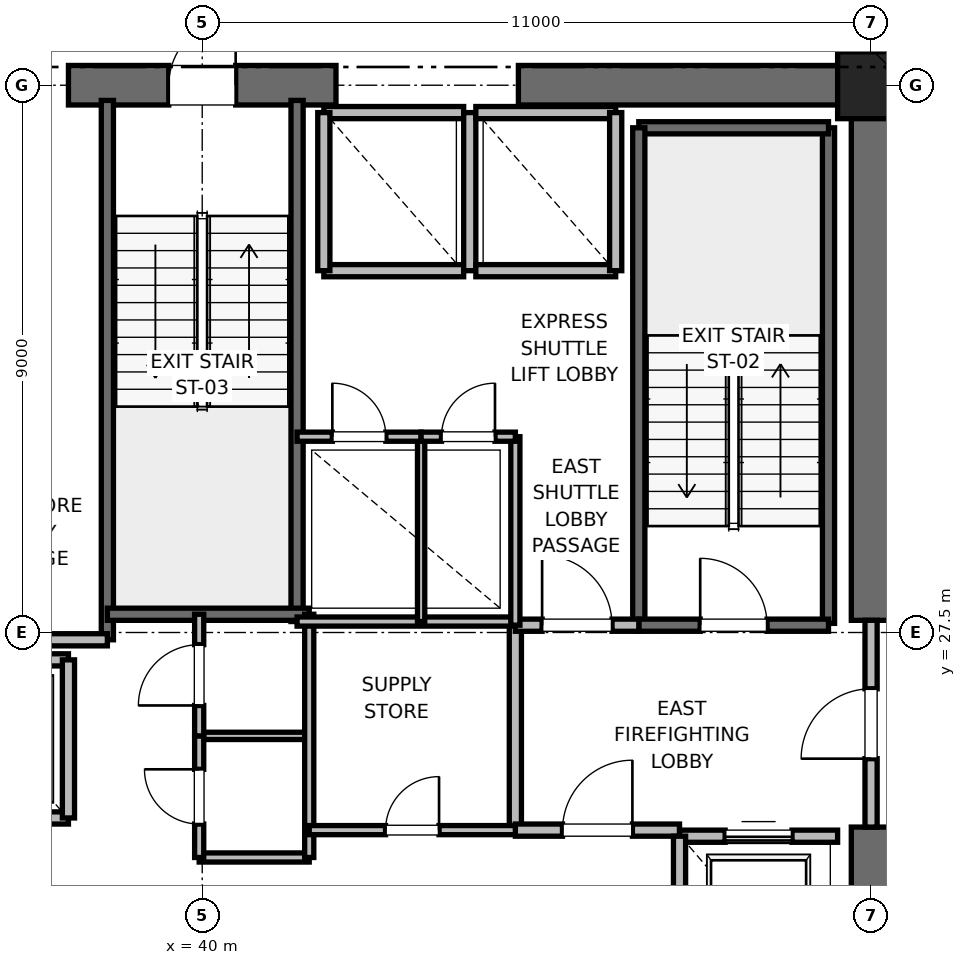
"""IFC4 building model, lengths in metres.
Left out: names, types, materials, properties, quantities, classifications, styles, units other than length and angle.
Written with IfcOpenShell. Run it as: python <this file> out.ifc"""

import sys

from ifc_helpers import new_model, si_unit, direction, frame, frame_2d, origin, origin_2d, place, context, subcontext, project, spatial, rectangle, extrude, element, fill, save


model = new_model("IFC4")
c1 = context("Model", 3, precision=1e-05, world=origin(), true_north=direction((0.0, 1.0)))
c2 = subcontext(c1, "Body", "Model", "MODEL_VIEW")
j1 = project(units=[si_unit("LENGTHUNIT", "METRE"), si_unit("PLANEANGLEUNIT", "RADIAN")], contexts=[c1])
p1 = place(None, origin())
s1 = spatial("IfcSite", under=j1, at=p1, CompositionType="ELEMENT")
p2 = place(p1, origin())
s2 = spatial("IfcBuilding", under=s1, at=p2, CompositionType="ELEMENT")
p3 = place(p2, frame((0.0, 0.0, 99.6)))
s3 = spatial("IfcBuildingStorey", under=s2, at=p3, CompositionType="ELEMENT", Elevation=99.6)
p4 = place(p3, frame((51.0, 36.5, 0.0), z_axis=(0.0, 0.0, 1.0), x_axis=(1.0, 0.0, 0.0)))
e1 = element("IfcColumn", 1, at=p4, inside=s3, PredefinedType="PILASTER", context=c2, shape_type="SweptSolid", body=[
    extrude(rectangle(XDim=1.1, YDim=1.1, at=origin_2d()), origin(), (0.0, 0.0, 1.0), 4.0),
])
p5 = place(p3, frame((37.8, 36.5, 0.0), z_axis=(0.0, 0.0, 1.0), x_axis=(1.0, 0.0, 0.0)))
e2 = element("IfcWall", 2, at=p5, inside=s3, PredefinedType="SHEAR", context=c2, shape_type="SweptSolid", body=[
    extrude(rectangle(XDim=4.4, YDim=0.65, at=frame_2d((2.2, 0.0))), origin(), (0.0, 0.0, 1.0), 3.76),
])
p6 = place(p5, frame((1.65, 0.0, 0.0)))
e3 = element("IfcOpeningElement", 3, at=p6, cuts=e2, PredefinedType="OPENING", context=c2, shape_type="SweptSolid", body=[
    extrude(rectangle(XDim=1.1, YDim=2.15, at=frame_2d((0.55, 1.075))), frame((0.0, 0.325, 0.0), z_axis=(0.0, -1.0, 0.0), x_axis=(1.0, 0.0, 0.0)), (0.0, 0.0, 1.0), 0.65),
])
for number, where, z_axis, x_axis in (
    (4, (45.2, 36.5, 0.0), (0.0, 0.0, 1.0), (1.0, 0.0, 0.0)),
    (5, (51.0, 18.5, 0.0), (0.0, 0.0, 1.0), (0.0, 1.0, 0.0)),
):
    element("IfcWall", number, at=place(p3, frame(where, z_axis=z_axis, x_axis=x_axis)), inside=s3, PredefinedType="SHEAR", context=c2, shape_type="SweptSolid", body=[
        extrude(rectangle(XDim=5.8, YDim=0.65, at=frame_2d((2.9, 0.0))), origin(), (0.0, 0.0, 1.0), 3.76),
    ])
p7 = place(p3, frame((51.0, 27.7, 0.0), z_axis=(0.0, 0.0, 1.0), x_axis=(0.0, 1.0, 0.0)))
e6 = element("IfcWall", 6, at=p7, inside=s3, PredefinedType="SHEAR", context=c2, shape_type="SweptSolid", body=[
    extrude(rectangle(XDim=8.8, YDim=0.65, at=frame_2d((4.4, 0.0))), origin(), (0.0, 0.0, 1.0), 3.76),
])
p8 = place(p3, frame((50.3, 27.65, 0.0), z_axis=(0.0, 0.0, 1.0), x_axis=(0.0, 1.0, 0.0)))
e7 = element("IfcWall", 7, at=p8, inside=s3, PredefinedType="SOLIDWALL", context=c2, shape_type="SweptSolid", body=[
    extrude(rectangle(XDim=8.15, YDim=0.2, at=frame_2d((4.075, 0.0))), origin(), (0.0, 0.0, 1.0), 3.76),
])
p9 = place(p3, frame((47.18, 35.8, 0.0), z_axis=(0.0, 0.0, 1.0), x_axis=(1.0, 0.0, 0.0)))
e8 = element("IfcWall", 8, at=p9, inside=s3, PredefinedType="SOLIDWALL", context=c2, shape_type="SweptSolid", body=[
    extrude(rectangle(XDim=3.12, YDim=0.2, at=frame_2d((1.56, 0.0))), origin(), (0.0, 0.0, 1.0), 3.76),
])
p10 = place(p3, frame((47.18, 27.62, 0.0), z_axis=(0.0, 0.0, 1.0), x_axis=(0.0, 1.0, 0.0)))
e9 = element("IfcWall", 9, at=p10, inside=s3, PredefinedType="SOLIDWALL", context=c2, shape_type="SweptSolid", body=[
    extrude(rectangle(XDim=8.18, YDim=0.2, at=frame_2d((4.09, 0.0))), origin(), (0.0, 0.0, 1.0), 3.76),
])
p11 = place(p3, frame((47.18, 27.62, 0.0), z_axis=(0.0, 0.0, 1.0), x_axis=(1.0, 0.0, 0.0)))
e10 = element("IfcWall", 10, at=p11, inside=s3, PredefinedType="SOLIDWALL", context=c2, shape_type="SweptSolid", body=[
    extrude(rectangle(XDim=3.12, YDim=0.2, at=frame_2d((1.56, 0.0))), origin(), (0.0, 0.0, 1.0), 3.76),
])
p12 = place(p11, frame((1.01, 0.0, 0.0)))
e11 = element("IfcOpeningElement", 11, at=p12, cuts=e10, PredefinedType="OPENING", context=c2, shape_type="SweptSolid", body=[
    extrude(rectangle(XDim=1.1, YDim=2.15, at=frame_2d((0.55, 1.075))), frame((0.0, 0.1, 0.0), z_axis=(0.0, -1.0, 0.0), x_axis=(1.0, 0.0, 0.0)), (0.0, 0.0, 1.0), 0.2),
])
p13 = place(p3, frame((38.44, 27.38, 0.0), z_axis=(0.0, 0.0, 1.0), x_axis=(0.0, 1.0, 0.0)))
e12 = element("IfcWall", 12, at=p13, inside=s3, PredefinedType="SOLIDWALL", context=c2, shape_type="SweptSolid", body=[
    extrude(rectangle(XDim=8.87, YDim=0.2, at=frame_2d((4.435, 0.0))), origin(), (0.0, 0.0, 1.0), 3.76),
])
p14 = place(p3, frame((41.56, 27.68, 0.0), z_axis=(0.0, 0.0, 1.0), x_axis=(0.0, 1.0, 0.0)))
e13 = element("IfcWall", 13, at=p14, inside=s3, PredefinedType="SOLIDWALL", context=c2, shape_type="SweptSolid", body=[
    extrude(rectangle(XDim=8.57, YDim=0.2, at=frame_2d((4.285, 0.0))), origin(), (0.0, 0.0, 1.0), 3.76),
])
p15 = place(p3, frame((38.44, 27.8, 0.0), z_axis=(0.0, 0.0, 1.0), x_axis=(1.0, 0.0, 0.0)))
e14 = element("IfcWall", 14, at=p15, inside=s3, PredefinedType="SOLIDWALL", context=c2, shape_type="SweptSolid", body=[
    extrude(rectangle(XDim=3.32, YDim=0.2, at=frame_2d((1.66, 0.0))), origin(), (0.0, 0.0, 1.0), 3.76),
])
p16 = place(p3, frame((32.82, 27.38, 0.0), z_axis=(0.0, 0.0, 1.0), x_axis=(1.0, 0.0, 0.0)))
e15 = element("IfcWall", 15, at=p16, inside=s3, PredefinedType="PARTITIONING", context=c2, shape_type="SweptSolid", body=[
    extrude(rectangle(XDim=5.62, YDim=0.2, at=frame_2d((2.81, 0.0))), origin(), (0.0, 0.0, 1.0), 3.76),
])
p17 = place(p3, frame((45.15, 24.25, 0.0), z_axis=(0.0, 0.0, 1.0), x_axis=(0.0, 1.0, 0.0)))
e16 = element("IfcWall", 16, at=p17, inside=s3, PredefinedType="PARTITIONING", context=c2, shape_type="SweptSolid", body=[
    extrude(rectangle(XDim=3.37, YDim=0.2, at=frame_2d((1.685, 0.0))), origin(), (0.0, 0.0, 1.0), 3.76),
])
p18 = place(p3, frame((45.15, 24.25, 0.0), z_axis=(0.0, 0.0, 1.0), x_axis=(1.0, 0.0, 0.0)))
e17 = element("IfcWall", 17, at=p18, inside=s3, PredefinedType="PARTITIONING", context=c2, shape_type="SweptSolid", body=[
    extrude(rectangle(XDim=2.7, YDim=0.2, at=frame_2d((1.35, 0.0))), origin(), (0.0, 0.0, 1.0), 3.76),
])
p19 = place(p18, frame((0.775, 0.0, 0.0)))
e18 = element("IfcOpeningElement", 18, at=p19, cuts=e17, PredefinedType="OPENING", context=c2, shape_type="SweptSolid", body=[
    extrude(rectangle(XDim=1.15, YDim=2.2, at=frame_2d((0.575, 1.1))), frame((0.0, 0.1, 0.0), z_axis=(0.0, -1.0, 0.0), x_axis=(1.0, 0.0, 0.0)), (0.0, 0.0, 1.0), 0.2),
])
p20 = place(p3, frame((45.15, 27.62, 0.0), z_axis=(0.0, 0.0, 1.0), x_axis=(1.0, 0.0, 0.0)))
e19 = element("IfcWall", 19, at=p20, inside=s3, PredefinedType="PARTITIONING", context=c2, shape_type="SweptSolid", body=[
    extrude(rectangle(XDim=2.03, YDim=0.2, at=frame_2d((1.015, 0.0))), origin(), (0.0, 0.0, 1.0), 3.76),
])
p21 = place(p20, frame((0.44, 0.0, 0.0)))
e20 = element("IfcOpeningElement", 20, at=p21, cuts=e19, PredefinedType="OPENING", context=c2, shape_type="SweptSolid", body=[
    extrude(rectangle(XDim=1.15, YDim=2.2, at=frame_2d((0.575, 1.1))), frame((0.0, 0.1, 0.0), z_axis=(0.0, -1.0, 0.0), x_axis=(1.0, 0.0, 0.0)), (0.0, 0.0, 1.0), 0.2),
])
p22 = place(p3, frame((51.0, 24.3, 0.0), z_axis=(0.0, 0.0, 1.0), x_axis=(0.0, 1.0, 0.0)))
e21 = element("IfcWall", 21, at=p22, inside=s3, PredefinedType="PARTITIONING", context=c2, shape_type="SweptSolid", body=[
    extrude(rectangle(XDim=3.4, YDim=0.2, at=frame_2d((1.7, 0.0))), origin(), (0.0, 0.0, 1.0), 2.54),
])
p23 = place(p22, frame((1.125, 0.0, 0.0)))
e22 = element("IfcOpeningElement", 22, at=p23, cuts=e21, PredefinedType="OPENING", context=c2, shape_type="SweptSolid", body=[
    extrude(rectangle(XDim=1.15, YDim=2.2, at=frame_2d((0.575, 1.1))), frame((0.0, 0.1, 0.0), z_axis=(0.0, -1.0, 0.0), x_axis=(1.0, 0.0, 0.0)), (0.0, 0.0, 1.0), 0.2),
])
p24 = place(p3, frame((50.45, 24.15, 0.0), z_axis=(0.0, 0.0, 1.0), x_axis=(-1.0, 0.0, 0.0)))
e23 = element("IfcWall", 23, at=p24, inside=s3, PredefinedType="SOLIDWALL", context=c2, shape_type="SweptSolid", body=[
    extrude(rectangle(XDim=2.6, YDim=0.2, at=frame_2d((1.3, 0.0))), origin(), (0.0, 0.0, 1.0), 2.54),
])
p25 = place(p24, frame((0.75, 0.0, 0.0)))
e24 = element("IfcOpeningElement", 24, at=p25, cuts=e23, PredefinedType="OPENING", context=c2, shape_type="SweptSolid", body=[
    extrude(rectangle(XDim=1.1, YDim=2.2, at=frame_2d((0.55, 1.1))), frame((0.0, 0.1, 0.0), z_axis=(0.0, -1.0, 0.0), x_axis=(1.0, 0.0, 0.0)), (0.0, 0.0, 1.0), 0.2),
])
p26 = place(p3, frame((47.85, 24.15, 0.0), z_axis=(0.0, 0.0, 1.0), x_axis=(0.0, -1.0, 0.0)))
e25 = element("IfcWall", 25, at=p26, inside=s3, PredefinedType="SOLIDWALL", context=c2, shape_type="SweptSolid", body=[
    extrude(rectangle(XDim=3.0, YDim=0.2, at=frame_2d((1.5, 0.0))), origin(), (0.0, 0.0, 1.0), 3.76),
])
p27 = place(p3, frame((35.5, 24.45, 0.0), z_axis=(0.0, 0.0, 1.0), x_axis=(1.0, 0.0, 0.0)))
e26 = element("IfcWall", 26, at=p27, inside=s3, PredefinedType="SOLIDWALL", context=c2, shape_type="SweptSolid", body=[
    extrude(rectangle(XDim=2.3, YDim=0.2, at=frame_2d((1.15, 0.0))), origin(), (0.0, 0.0, 1.0), 3.76),
])
p28 = place(p27, frame((0.6, 0.0, 0.0)))
e27 = element("IfcOpeningElement", 27, at=p28, cuts=e26, PredefinedType="OPENING", context=c2, shape_type="SweptSolid", body=[
    extrude(rectangle(XDim=1.1, YDim=2.2, at=frame_2d((0.55, 1.1))), frame((0.0, 0.1, 0.0), z_axis=(0.0, -1.0, 0.0), x_axis=(1.0, 0.0, 0.0)), (0.0, 0.0, 1.0), 0.2),
])
p29 = place(p3, frame((37.8, 27.05, 0.0), z_axis=(0.0, 0.0, 1.0), x_axis=(-1.0, 0.0, 0.0)))
e28 = element("IfcWall", 28, at=p29, inside=s3, PredefinedType="SOLIDWALL", context=c2, shape_type="SweptSolid", body=[
    extrude(rectangle(XDim=2.3, YDim=0.2, at=frame_2d((1.15, 0.0))), origin(), (0.0, 0.0, 1.0), 3.76),
])
p30 = place(p3, frame((37.8, 24.45, 0.0), z_axis=(0.0, 0.0, 1.0), x_axis=(0.0, 1.0, 0.0)))
e29 = element("IfcWall", 29, at=p30, inside=s3, PredefinedType="SOLIDWALL", context=c2, shape_type="SweptSolid", body=[
    extrude(rectangle(XDim=2.6, YDim=0.2, at=frame_2d((1.3, 0.0))), origin(), (0.0, 0.0, 1.0), 3.76),
])
p31 = place(p3, frame((42.0, 33.45, 0.0), z_axis=(0.0, 0.0, 1.0), x_axis=(1.0, 0.0, 0.0)))
e30 = element("IfcWall", 30, at=p31, inside=s3, PredefinedType="SOLIDWALL", context=c2, shape_type="SweptSolid", body=[
    extrude(rectangle(XDim=2.3, YDim=0.2, at=frame_2d((1.15, 0.0))), origin(), (0.0, 0.0, 1.0), 3.76),
])
p32 = place(p3, frame((44.3, 36.05, 0.0), z_axis=(0.0, 0.0, 1.0), x_axis=(-1.0, 0.0, 0.0)))
e31 = element("IfcWall", 31, at=p32, inside=s3, PredefinedType="SOLIDWALL", context=c2, shape_type="SweptSolid", body=[
    extrude(rectangle(XDim=2.3, YDim=0.2, at=frame_2d((1.15, 0.0))), origin(), (0.0, 0.0, 1.0), 2.54),
])
for number, where, z_axis, x_axis in (
    (32, (42.0, 36.05, 0.0), (0.0, 0.0, 1.0), (0.0, -1.0, 0.0)),
    (33, (44.4, 33.45, 0.0), (0.0, 0.0, 1.0), (0.0, 1.0, 0.0)),
):
    element("IfcWall", number, at=place(p3, frame(where, z_axis=z_axis, x_axis=x_axis)), inside=s3, PredefinedType="SOLIDWALL", context=c2, shape_type="SweptSolid", body=[
        extrude(rectangle(XDim=2.6, YDim=0.2, at=frame_2d((1.3, 0.0))), origin(), (0.0, 0.0, 1.0), 2.54),
    ])
p33 = place(p3, frame((44.5, 33.45, 0.0), z_axis=(0.0, 0.0, 1.0), x_axis=(1.0, 0.0, 0.0)))
e34 = element("IfcWall", 34, at=p33, inside=s3, PredefinedType="SOLIDWALL", context=c2, shape_type="SweptSolid", body=[
    extrude(rectangle(XDim=2.3, YDim=0.2, at=frame_2d((1.15, 0.0))), origin(), (0.0, 0.0, 1.0), 3.76),
])
p34 = place(p3, frame((46.8, 36.05, 0.0), z_axis=(0.0, 0.0, 1.0), x_axis=(-1.0, 0.0, 0.0)))
e35 = element("IfcWall", 35, at=p34, inside=s3, PredefinedType="SOLIDWALL", context=c2, shape_type="SweptSolid", body=[
    extrude(rectangle(XDim=2.3, YDim=0.2, at=frame_2d((1.15, 0.0))), origin(), (0.0, 0.0, 1.0), 2.54),
])
p35 = place(p3, frame((46.8, 33.45, 0.0), z_axis=(0.0, 0.0, 1.0), x_axis=(0.0, 1.0, 0.0)))
e36 = element("IfcWall", 36, at=p35, inside=s3, PredefinedType="SOLIDWALL", context=c2, shape_type="SweptSolid", body=[
    extrude(rectangle(XDim=2.6, YDim=0.2, at=frame_2d((1.3, 0.0))), origin(), (0.0, 0.0, 1.0), 3.76),
])
p36 = place(p3, frame((39.95, 23.8, 0.0), z_axis=(0.0, 0.0, 1.0), x_axis=(1.0, 0.0, 0.0)))
e37 = element("IfcWall", 37, at=p36, inside=s3, PredefinedType="PARTITIONING", context=c2, shape_type="SweptSolid", body=[
    extrude(rectangle(XDim=1.81, YDim=0.15, at=frame_2d((0.905, 0.0))), origin(), (0.0, 0.0, 1.0), 2.85),
])
p37 = place(p3, frame((39.95, 25.8, 0.0), z_axis=(0.0, 0.0, 1.0), x_axis=(1.0, 0.0, 0.0)))
e38 = element("IfcWall", 38, at=p37, inside=s3, PredefinedType="PARTITIONING", context=c2, shape_type="SweptSolid", body=[
    extrude(rectangle(XDim=1.81, YDim=0.12, at=frame_2d((0.905, 0.0))), origin(), (0.0, 0.0, 1.0), 2.85),
])
p38 = place(p3, frame((41.76, 23.8, 0.0), z_axis=(0.0, 0.0, 1.0), x_axis=(0.0, 1.0, 0.0)))
e39 = element("IfcWall", 39, at=p38, inside=s3, PredefinedType="PARTITIONING", context=c2, shape_type="SweptSolid", body=[
    extrude(rectangle(XDim=4.0, YDim=0.15, at=frame_2d((2.0, 0.0))), origin(), (0.0, 0.0, 1.0), 2.85),
])
p39 = place(p3, frame((39.95, 23.8, 0.0), z_axis=(0.0, 0.0, 1.0), x_axis=(0.0, 1.0, 0.0)))
e40 = element("IfcWall", 40, at=p39, inside=s3, PredefinedType="PARTITIONING", context=c2, shape_type="SweptSolid", body=[
    extrude(rectangle(XDim=2.0, YDim=0.15, at=frame_2d((1.0, 0.0))), origin(), (0.0, 0.0, 1.0), 2.85),
])
p40 = place(p39, frame((0.55, 0.0, 0.0)))
e41 = element("IfcOpeningElement", 41, at=p40, cuts=e40, PredefinedType="OPENING", context=c2, shape_type="SweptSolid", body=[
    extrude(rectangle(XDim=0.9, YDim=2.1, at=frame_2d((0.45, 1.05))), frame((0.0, 0.075, 0.0), z_axis=(0.0, -1.0, 0.0), x_axis=(1.0, 0.0, 0.0)), (0.0, 0.0, 1.0), 0.15),
])
p41 = place(p3, frame((39.95, 25.8, 0.0), z_axis=(0.0, 0.0, 1.0), x_axis=(0.0, 1.0, 0.0)))
e42 = element("IfcWall", 42, at=p41, inside=s3, PredefinedType="PARTITIONING", context=c2, shape_type="SweptSolid", body=[
    extrude(rectangle(XDim=2.0, YDim=0.15, at=frame_2d((1.0, 0.0))), origin(), (0.0, 0.0, 1.0), 2.85),
])
p42 = place(p41, frame((0.5, 0.0, 0.0)))
e43 = element("IfcOpeningElement", 43, at=p42, cuts=e42, PredefinedType="OPENING", context=c2, shape_type="SweptSolid", body=[
    extrude(rectangle(XDim=1.0, YDim=2.15, at=frame_2d((0.5, 1.075))), frame((0.0, 0.075, 0.0), z_axis=(0.0, -1.0, 0.0), x_axis=(1.0, 0.0, 0.0)), (0.0, 0.0, 1.0), 0.15),
])
p43 = place(p3, frame((41.56, 27.68, 0.0), z_axis=(0.0, 0.0, 1.0), x_axis=(1.0, 0.0, 0.0)))
e44 = element("IfcWall", 44, at=p43, inside=s3, PredefinedType="PARTITIONING", context=c2, shape_type="SweptSolid", body=[
    extrude(rectangle(XDim=3.59, YDim=0.15, at=frame_2d((1.795, 0.0))), origin(), (0.0, 0.0, 1.0), 2.85),
])
p44 = place(p3, frame((41.76, 24.25, 0.0), z_axis=(0.0, 0.0, 1.0), x_axis=(1.0, 0.0, 0.0)))
e45 = element("IfcWall", 45, at=p44, inside=s3, PredefinedType="PARTITIONING", context=c2, shape_type="SweptSolid", body=[
    extrude(rectangle(XDim=3.39, YDim=0.15, at=frame_2d((1.695, 0.0))), origin(), (0.0, 0.0, 1.0), 2.85),
])
p45 = place(p44, frame((1.255, 0.0, 0.0)))
e46 = element("IfcOpeningElement", 46, at=p45, cuts=e45, PredefinedType="OPENING", context=c2, shape_type="SweptSolid", body=[
    extrude(rectangle(XDim=0.88, YDim=2.1, at=frame_2d((0.44, 1.05))), frame((0.0, 0.075, 0.0), z_axis=(0.0, -1.0, 0.0), x_axis=(1.0, 0.0, 0.0)), (0.0, 0.0, 1.0), 0.15),
])
p46 = place(p3, frame((45.15, 27.62, 0.0), z_axis=(0.0, 0.0, 1.0), x_axis=(0.0, 1.0, 0.0)))
e47 = element("IfcWall", 47, at=p46, inside=s3, PredefinedType="PARTITIONING", context=c2, shape_type="SweptSolid", body=[
    extrude(rectangle(XDim=3.1, YDim=0.15, at=frame_2d((1.55, 0.0))), origin(), (0.0, 0.0, 1.0), 2.85),
])
p47 = place(p3, frame((43.6, 27.68, 0.0), z_axis=(0.0, 0.0, 1.0), x_axis=(0.0, 1.0, 0.0)))
e48 = element("IfcWall", 48, at=p47, inside=s3, PredefinedType="PARTITIONING", context=c2, shape_type="SweptSolid", body=[
    extrude(rectangle(XDim=3.04, YDim=0.12, at=frame_2d((1.52, 0.0))), origin(), (0.0, 0.0, 1.0), 2.85),
])
p48 = place(p3, frame((41.56, 30.72, 0.0), z_axis=(0.0, 0.0, 1.0), x_axis=(1.0, 0.0, 0.0)))
e49 = element("IfcWall", 49, at=p48, inside=s3, PredefinedType="PARTITIONING", context=c2, shape_type="SweptSolid", body=[
    extrude(rectangle(XDim=2.04, YDim=0.15, at=frame_2d((1.02, 0.0))), origin(), (0.0, 0.0, 1.0), 2.85),
])
p49 = place(p48, frame((0.58, 0.0, 0.0)))
e50 = element("IfcOpeningElement", 50, at=p49, cuts=e49, PredefinedType="OPENING", context=c2, shape_type="SweptSolid", body=[
    extrude(rectangle(XDim=0.88, YDim=2.1, at=frame_2d((0.44, 1.05))), frame((0.0, 0.075, 0.0), z_axis=(0.0, -1.0, 0.0), x_axis=(1.0, 0.0, 0.0)), (0.0, 0.0, 1.0), 0.15),
])
p50 = place(p3, frame((43.6, 30.72, 0.0), z_axis=(0.0, 0.0, 1.0), x_axis=(1.0, 0.0, 0.0)))
e51 = element("IfcWall", 51, at=p50, inside=s3, PredefinedType="PARTITIONING", context=c2, shape_type="SweptSolid", body=[
    extrude(rectangle(XDim=1.55, YDim=0.15, at=frame_2d((0.775, 0.0))), origin(), (0.0, 0.0, 1.0), 2.85),
])
p51 = place(p50, frame((0.335, 0.0, 0.0)))
e52 = element("IfcOpeningElement", 52, at=p51, cuts=e51, PredefinedType="OPENING", context=c2, shape_type="SweptSolid", body=[
    extrude(rectangle(XDim=0.88, YDim=2.1, at=frame_2d((0.44, 1.05))), frame((0.0, 0.075, 0.0), z_axis=(0.0, -1.0, 0.0), x_axis=(1.0, 0.0, 0.0)), (0.0, 0.0, 1.0), 0.15),
])
p52 = place(p12, origin())
e53 = element("IfcDoor", 53, at=p52, inside=s3, OperationType="SINGLE_SWING_LEFT", PredefinedType="DOOR", context=c2, shape_type="SweptSolid", body=[
    extrude(rectangle(XDim=1.1, YDim=2.15, at=frame_2d((0.55, 1.075))), frame((0.0, 0.025, 0.0), z_axis=(0.0, -1.0, 0.0), x_axis=(1.0, 0.0, 0.0)), (0.0, 0.0, 1.0), 0.05),
])
fill(e11, e53)
p53 = place(p6, origin())
e54 = element("IfcDoor", 54, at=p53, inside=s3, OperationType="SINGLE_SWING_RIGHT", PredefinedType="DOOR", context=c2, shape_type="SweptSolid", body=[
    extrude(rectangle(XDim=1.1, YDim=2.15, at=frame_2d((0.55, 1.075))), frame((0.0, 0.025, 0.0), z_axis=(0.0, -1.0, 0.0), x_axis=(1.0, 0.0, 0.0)), (0.0, 0.0, 1.0), 0.05),
])
fill(e3, e54)
p54 = place(p19, origin())
e55 = element("IfcDoor", 55, at=p54, inside=s3, OperationType="SINGLE_SWING_RIGHT", PredefinedType="DOOR", context=c2, shape_type="SweptSolid", body=[
    extrude(rectangle(XDim=1.15, YDim=2.2, at=frame_2d((0.575, 1.1))), frame((0.0, 0.025, 0.0), z_axis=(0.0, -1.0, 0.0), x_axis=(1.0, 0.0, 0.0)), (0.0, 0.0, 1.0), 0.05),
])
fill(e18, e55)
p55 = place(p21, origin())
e56 = element("IfcDoor", 56, at=p55, inside=s3, OperationType="SINGLE_SWING_LEFT", PredefinedType="DOOR", context=c2, shape_type="SweptSolid", body=[
    extrude(rectangle(XDim=1.15, YDim=2.2, at=frame_2d((0.575, 1.1))), frame((0.0, 0.025, 0.0), z_axis=(0.0, -1.0, 0.0), x_axis=(1.0, 0.0, 0.0)), (0.0, 0.0, 1.0), 0.05),
])
fill(e20, e56)
p56 = place(p23, origin())
e57 = element("IfcDoor", 57, at=p56, inside=s3, OperationType="SINGLE_SWING_LEFT", PredefinedType="DOOR", context=c2, shape_type="SweptSolid", body=[
    extrude(rectangle(XDim=1.15, YDim=2.2, at=frame_2d((0.575, 1.1))), frame((0.0, 0.025, 0.0), z_axis=(0.0, -1.0, 0.0), x_axis=(1.0, 0.0, 0.0)), (0.0, 0.0, 1.0), 0.05),
])
fill(e22, e57)
p57 = place(p25, origin())
e58 = element("IfcDoor", 58, at=p57, inside=s3, OperationType="SLIDING_TO_RIGHT", PredefinedType="DOOR", context=c2, shape_type="SweptSolid", body=[
    extrude(rectangle(XDim=1.1, YDim=2.2, at=frame_2d((0.55, 1.1))), frame((0.0, 0.025, 0.0), z_axis=(0.0, -1.0, 0.0), x_axis=(1.0, 0.0, 0.0)), (0.0, 0.0, 1.0), 0.05),
])
fill(e24, e58)
p58 = place(p40, origin())
e59 = element("IfcDoor", 59, at=p58, inside=s3, OperationType="SINGLE_SWING_RIGHT", PredefinedType="DOOR", context=c2, shape_type="SweptSolid", body=[
    extrude(rectangle(XDim=0.9, YDim=2.1, at=frame_2d((0.45, 1.05))), frame((0.0, 0.025, 0.0), z_axis=(0.0, -1.0, 0.0), x_axis=(1.0, 0.0, 0.0)), (0.0, 0.0, 1.0), 0.05),
])
fill(e41, e59)
p59 = place(p42, origin())
e60 = element("IfcDoor", 60, at=p59, inside=s3, OperationType="SINGLE_SWING_LEFT", PredefinedType="DOOR", context=c2, shape_type="SweptSolid", body=[
    extrude(rectangle(XDim=1.0, YDim=2.15, at=frame_2d((0.5, 1.075))), frame((0.0, 0.025, 0.0), z_axis=(0.0, -1.0, 0.0), x_axis=(1.0, 0.0, 0.0)), (0.0, 0.0, 1.0), 0.05),
])
fill(e43, e60)
p60 = place(p45, origin())
e61 = element("IfcDoor", 61, at=p60, inside=s3, OperationType="SINGLE_SWING_RIGHT", PredefinedType="DOOR", context=c2, shape_type="SweptSolid", body=[
    extrude(rectangle(XDim=0.88, YDim=2.1, at=frame_2d((0.44, 1.05))), frame((0.0, 0.025, 0.0), z_axis=(0.0, -1.0, 0.0), x_axis=(1.0, 0.0, 0.0)), (0.0, 0.0, 1.0), 0.05),
])
fill(e46, e61)
p61 = place(p49, origin())
e62 = element("IfcDoor", 62, at=p61, inside=s3, OperationType="SINGLE_SWING_LEFT", PredefinedType="DOOR", context=c2, shape_type="SweptSolid", body=[
    extrude(rectangle(XDim=0.88, YDim=2.1, at=frame_2d((0.44, 1.05))), frame((0.0, 0.025, 0.0), z_axis=(0.0, -1.0, 0.0), x_axis=(1.0, 0.0, 0.0)), (0.0, 0.0, 1.0), 0.05),
])
fill(e50, e62)
p62 = place(p51, origin())
e63 = element("IfcDoor", 63, at=p62, inside=s3, OperationType="SINGLE_SWING_RIGHT", PredefinedType="DOOR", context=c2, shape_type="SweptSolid", body=[
    extrude(rectangle(XDim=0.88, YDim=2.1, at=frame_2d((0.44, 1.05))), frame((0.0, 0.025, 0.0), z_axis=(0.0, -1.0, 0.0), x_axis=(1.0, 0.0, 0.0)), (0.0, 0.0, 1.0), 0.05),
])
fill(e52, e63)
save(model, sys.argv[1])
